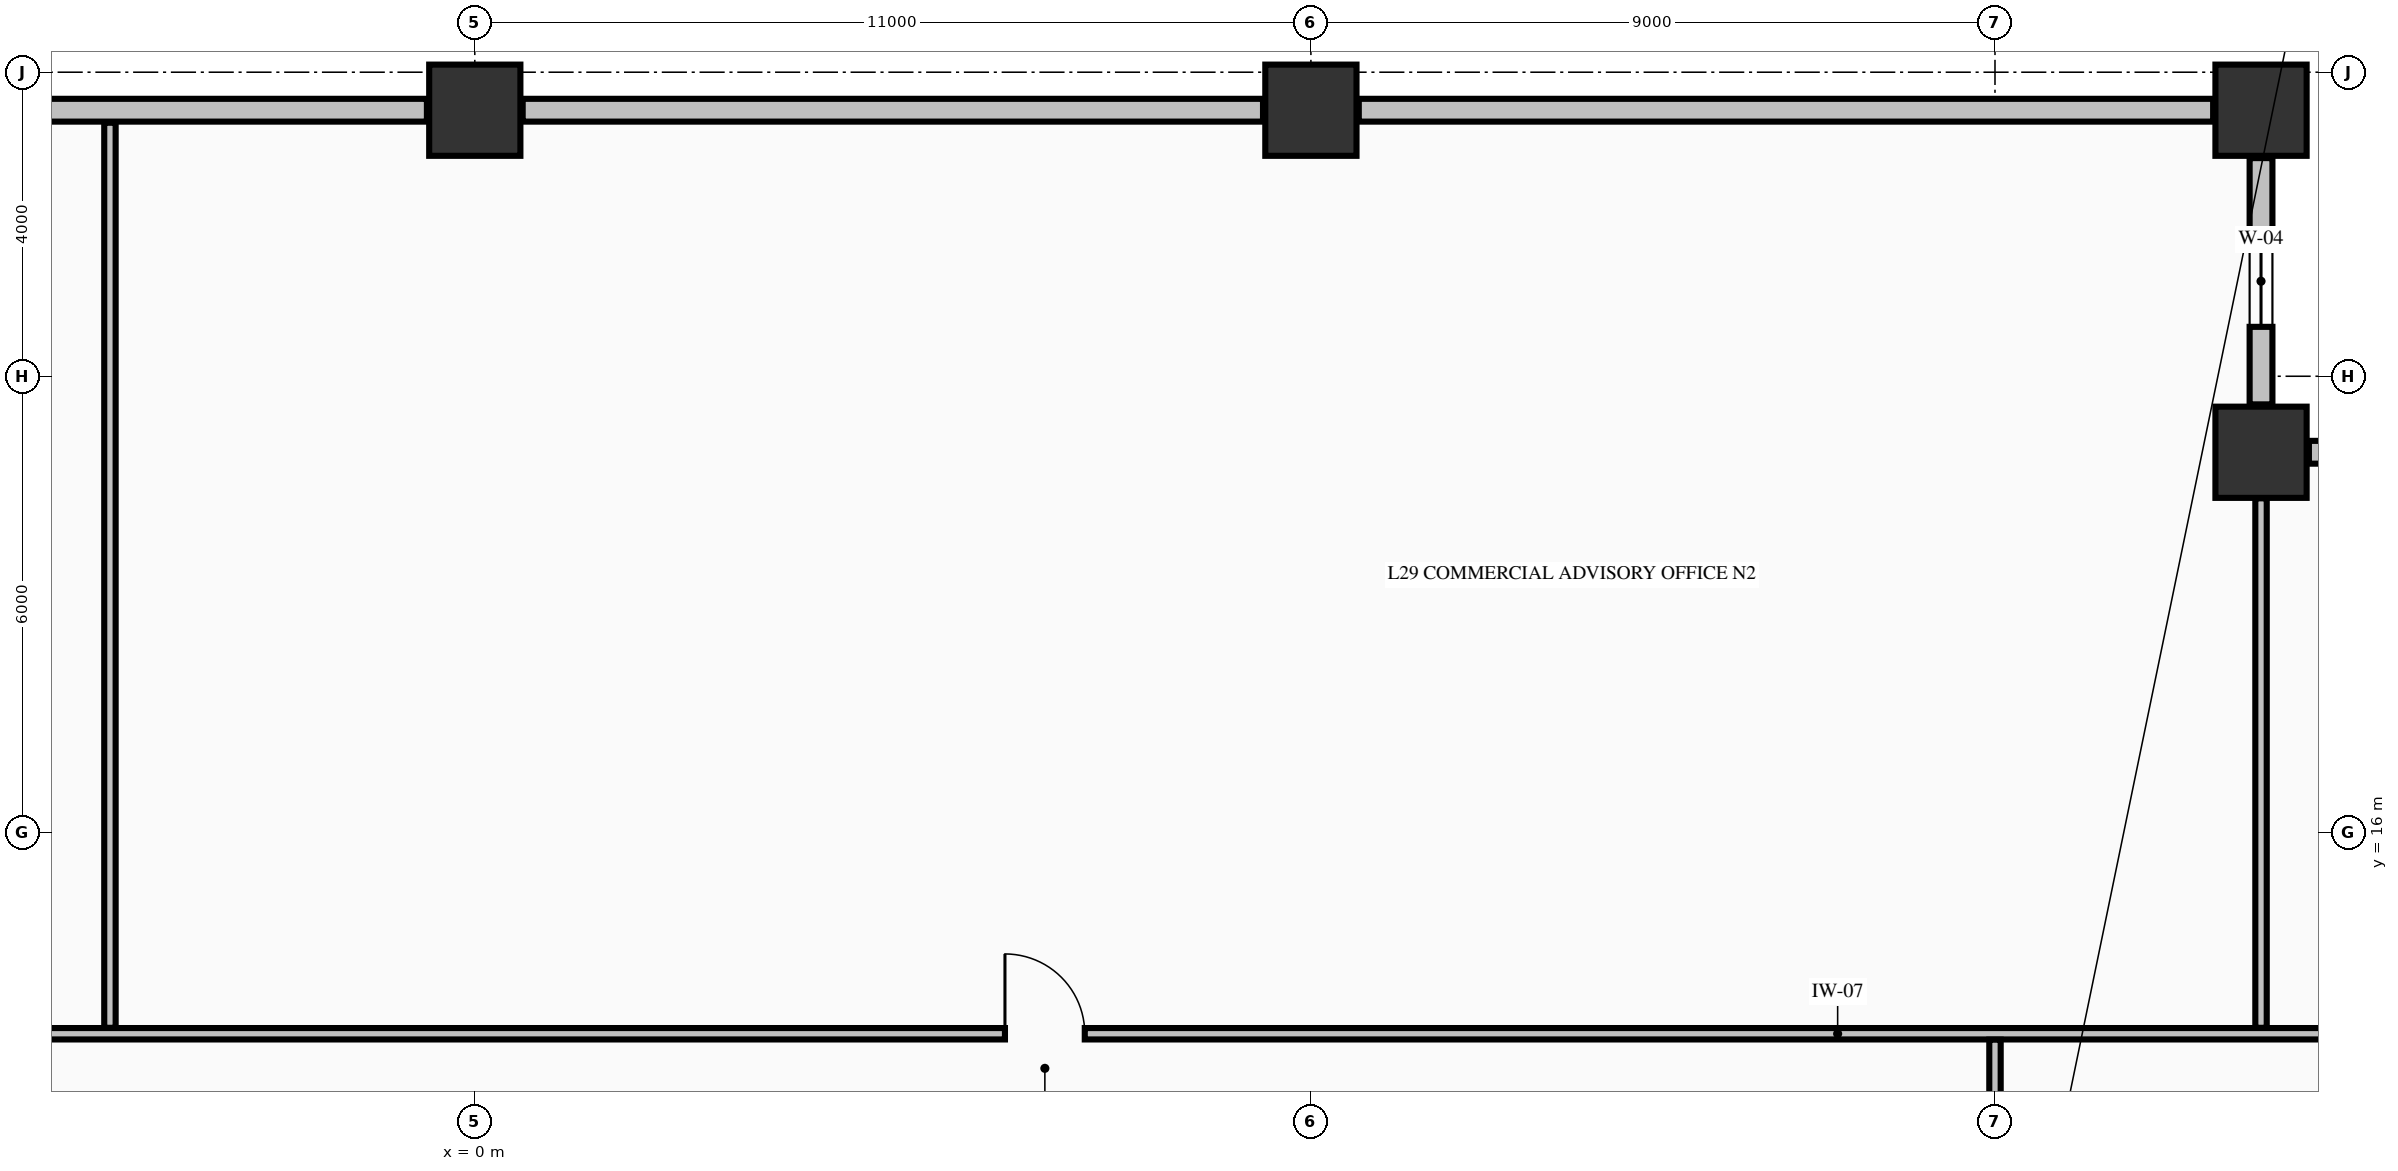
"""IFC4 building model, lengths in metres.
Left out: names, types, materials, properties, quantities, classifications, styles, units other than length and angle.
Written with IfcOpenShell. Run it as: python <this file> out.ifc"""

import sys

from ifc_helpers import new_model, si_unit, direction, frame, frame_2d, origin, origin_2d, place, context, subcontext, project, spatial, rectangle, extrude, element, fill, save


model = new_model("IFC4")
c1 = context("Model", 3, precision=1e-05, world=origin(), true_north=direction((0.0, 1.0)))
c2 = subcontext(c1, "Body", "Model", "MODEL_VIEW")
j1 = project(units=[si_unit("LENGTHUNIT", "METRE"), si_unit("PLANEANGLEUNIT", "RADIAN")], contexts=[c1])
p1 = place(None, origin())
s1 = spatial("IfcSite", under=j1, at=p1, CompositionType="ELEMENT")
p2 = place(p1, origin())
s2 = spatial("IfcBuilding", under=s1, at=p2, CompositionType="ELEMENT")
p3 = place(p2, frame((0.0, 0.0, 116.35)))
s3 = spatial("IfcBuildingStorey", under=s2, at=p3, CompositionType="ELEMENT", Elevation=116.35)
for number, where, z_axis, x_axis in (
    (1, (0.0, 25.5, -0.425), (0.0, 0.0, 1.0), (1.0, 0.0, 0.0)),
    (2, (11.0, 25.5, -0.425), (0.0, 0.0, 1.0), (1.0, 0.0, 0.0)),
    (3, (23.5, 25.5, -0.425), (0.0, 0.0, 1.0), (1.0, 0.0, 0.0)),
    (4, (23.5, 21.0, -0.425), (0.0, 0.0, 1.0), (1.0, 0.0, 0.0)),
):
    element("IfcColumn", number, at=place(p3, frame(where, z_axis=z_axis, x_axis=x_axis)), inside=s3, PredefinedType="COLUMN", context=c2, shape_type="SweptSolid", body=[
        extrude(rectangle(XDim=1.2, YDim=1.2, at=origin_2d()), origin(), (0.0, 0.0, 1.0), 5.0),
    ])
p4 = place(p3, frame((27.37, 21.0, 0.0), z_axis=(0.0, 0.0, 1.0), x_axis=(-1.0, 0.0, 0.0)))
e5 = element("IfcWall", 5, at=p4, inside=s3, PredefinedType="STANDARD", context=c2, shape_type="SweptSolid", body=[
    extrude(rectangle(XDim=3.24, YDim=0.3, at=frame_2d((1.62, 0.0))), origin(), (0.0, 0.0, 1.0), 2.167),
])
p5 = place(p3, frame((23.5, 21.63, 0.0), z_axis=(0.0, 0.0, 1.0), x_axis=(0.0, 1.0, 0.0)))
e6 = element("IfcWall", 6, at=p5, inside=s3, PredefinedType="STANDARD", context=c2, shape_type="SweptSolid", body=[
    extrude(rectangle(XDim=3.24, YDim=0.3, at=frame_2d((1.62, 0.0))), origin(), (0.0, 0.0, 1.0), 2.767),
])
p6 = place(p5, frame((1.02, 0.0, 0.82)))
e7 = element("IfcOpeningElement", 7, at=p6, cuts=e6, PredefinedType="OPENING", context=c2, shape_type="SweptSolid", body=[
    extrude(rectangle(XDim=1.2, YDim=1.65, at=frame_2d((0.6, 0.825))), frame((0.0, 0.16, 0.0), z_axis=(0.0, -1.0, 0.0), x_axis=(1.0, 0.0, 0.0)), (0.0, 0.0, 1.0), 0.32),
])
for number, where, z_axis, x_axis in (
    (8, (-0.63, 25.5, 0.0), (0.0, 0.0, 1.0), (-1.0, 0.0, 0.0)),
    (9, (10.37, 25.5, 0.0), (0.0, 0.0, 1.0), (-1.0, 0.0, 0.0)),
):
    element("IfcWall", number, at=place(p3, frame(where, z_axis=z_axis, x_axis=x_axis)), inside=s3, PredefinedType="STANDARD", context=c2, shape_type="SweptSolid", body=[
        extrude(rectangle(XDim=9.74, YDim=0.3, at=frame_2d((4.87, 0.0))), origin(), (0.0, 0.0, 1.0), 2.167),
    ])
p7 = place(p3, frame((22.87, 25.5, 0.0), z_axis=(0.0, 0.0, 1.0), x_axis=(-1.0, 0.0, 0.0)))
e10 = element("IfcWall", 10, at=p7, inside=s3, PredefinedType="STANDARD", context=c2, shape_type="SweptSolid", body=[
    extrude(rectangle(XDim=11.24, YDim=0.3, at=frame_2d((5.62, 0.0))), origin(), (0.0, 0.0, 1.0), 2.167),
])
p8 = place(p3, frame((-22.835, 13.35, 0.0), z_axis=(0.0, 0.0, 1.0), x_axis=(1.0, 0.0, 0.0)))
e11 = element("IfcWall", 11, at=p8, inside=s3, PredefinedType="PARTITIONING", context=c2, shape_type="SweptSolid", body=[
    extrude(rectangle(XDim=50.67, YDim=0.15, at=frame_2d((25.335, 0.0))), origin(), (0.0, 0.0, 1.0), 4.575),
])
p9 = place(p8, frame((15.86, 0.0, 0.0)))
e12 = element("IfcOpeningElement", 12, at=p9, cuts=e11, PredefinedType="OPENING", context=c2, shape_type="SweptSolid", body=[
    extrude(rectangle(XDim=1.05, YDim=2.15, at=frame_2d((0.525, 1.075))), frame((0.0, 0.085, 0.0), z_axis=(0.0, -1.0, 0.0), x_axis=(1.0, 0.0, 0.0)), (0.0, 0.0, 1.0), 0.17),
])
p10 = place(p8, frame((29.81, 0.0, 0.0)))
e13 = element("IfcOpeningElement", 13, at=p10, cuts=e11, PredefinedType="OPENING", context=c2, shape_type="SweptSolid", body=[
    extrude(rectangle(XDim=1.05, YDim=2.15, at=frame_2d((0.525, 1.075))), frame((0.0, 0.085, 0.0), z_axis=(0.0, -1.0, 0.0), x_axis=(1.0, 0.0, 0.0)), (0.0, 0.0, 1.0), 0.17),
])
p11 = place(p3, frame((-4.8, 13.428, 0.0), z_axis=(0.0, 0.0, 1.0), x_axis=(0.0, 1.0, 0.0)))
e14 = element("IfcWall", 14, at=p11, inside=s3, PredefinedType="PARTITIONING", context=c2, shape_type="SweptSolid", body=[
    extrude(rectangle(XDim=11.907, YDim=0.15, at=frame_2d((5.954, 0.0))), origin(), (0.0, 0.0, 1.0), 4.575),
])
p12 = place(p3, frame((20.0, 11.006, 0.0), z_axis=(0.0, 0.0, 1.0), x_axis=(0.0, 1.0, 0.0)))
e15 = element("IfcWall", 15, at=p12, inside=s3, PredefinedType="PARTITIONING", context=c2, shape_type="SweptSolid", body=[
    extrude(rectangle(XDim=2.266, YDim=0.15, at=frame_2d((1.133, 0.0))), origin(), (0.0, 0.0, 1.0), 4.03),
])
p13 = place(p12, frame((0.449, 0.0, 0.0)))
e16 = element("IfcOpeningElement", 16, at=p13, cuts=e15, PredefinedType="OPENING", context=c2, shape_type="SweptSolid", body=[
    extrude(rectangle(XDim=0.95, YDim=2.02, at=frame_2d((0.475, 1.01))), frame((0.0, 0.085, 0.0), z_axis=(0.0, -1.0, 0.0), x_axis=(1.0, 0.0, 0.0)), (0.0, 0.0, 1.0), 0.17),
])
p14 = place(p3, frame((23.5, 13.428, 0.0), z_axis=(0.0, 0.0, 1.0), x_axis=(0.0, 1.0, 0.0)))
e17 = element("IfcWall", 17, at=p14, inside=s3, PredefinedType="PARTITIONING", context=c2, shape_type="SweptSolid", body=[
    extrude(rectangle(XDim=6.966, YDim=0.15, at=frame_2d((3.483, 0.0))), origin(), (0.0, 0.0, 1.0), 2.167),
])
p15 = place(p6, origin())
e18 = element("IfcWindow", 18, at=p15, inside=s3, PartitioningType="SINGLE_PANEL", PredefinedType="WINDOW", context=c2, shape_type="SweptSolid", body=[
    extrude(rectangle(XDim=1.2, YDim=1.65, at=frame_2d((0.6, 0.825))), frame((0.0, 0.03, 0.0), z_axis=(0.0, -1.0, 0.0), x_axis=(1.0, 0.0, 0.0)), (0.0, 0.0, 1.0), 0.06),
])
fill(e7, e18)
p16 = place(p10, origin())
e19 = element("IfcDoor", 19, at=p16, inside=s3, OperationType="SINGLE_SWING_LEFT", PredefinedType="DOOR", context=c2, shape_type="SweptSolid", body=[
    extrude(rectangle(XDim=1.05, YDim=2.15, at=frame_2d((0.525, 1.075))), frame((0.0, 0.025, 0.0), z_axis=(0.0, -1.0, 0.0), x_axis=(1.0, 0.0, 0.0)), (0.0, 0.0, 1.0), 0.05),
])
fill(e13, e19)
save(model, sys.argv[1])
